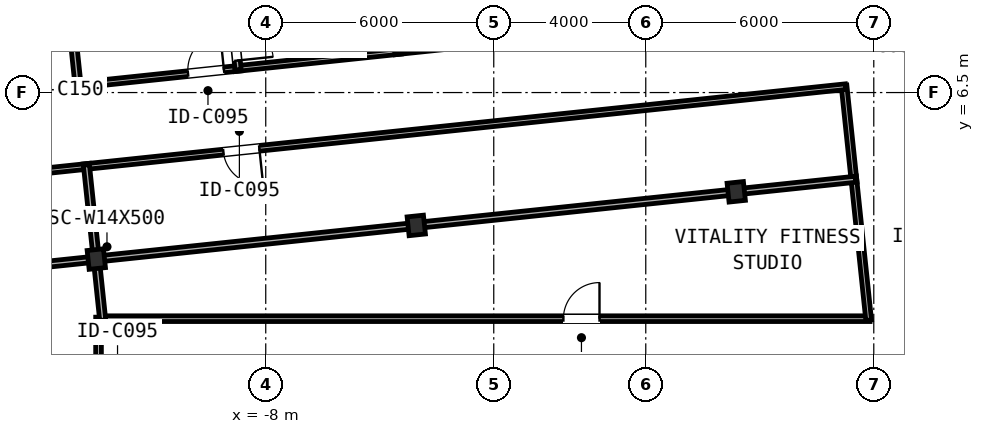
"""IFC4 building model, lengths in metres.
Left out: names, types, materials, properties, quantities, classifications, styles, units other than length and angle.
Written with IfcOpenShell. Run it as: python <this file> out.ifc"""

import sys

from ifc_helpers import new_model, si_unit, direction, frame, frame_2d, origin, origin_2d, place, context, subcontext, project, spatial, rectangle, i_section, extrude, element, fill, save


model = new_model("IFC4")
c1 = context("Model", 3, precision=1e-05, world=origin(), true_north=direction((0.0, 1.0)))
c2 = subcontext(c1, "Body", "Model", "MODEL_VIEW")
j1 = project(units=[si_unit("LENGTHUNIT", "METRE"), si_unit("PLANEANGLEUNIT", "RADIAN")], contexts=[c1])
p1 = place(None, origin())
s1 = spatial("IfcSite", under=j1, at=p1, CompositionType="ELEMENT")
p2 = place(p1, origin())
s2 = spatial("IfcBuilding", under=s1, at=p2, CompositionType="ELEMENT")
p3 = place(p2, frame((0.0, 0.0, 106.35)))
s3 = spatial("IfcBuildingStorey", under=s2, at=p3, CompositionType="ELEMENT", Elevation=106.35)
for number, where, z_axis, x_axis in (
    (1, (-12.459, 2.119, 0.0), (0.0, 0.0, 1.0), (0.995, 0.105, 0.0)),
    (2, (-4.039, 3.004, 0.0), (0.0, 0.0, 1.0), (0.995, 0.105, 0.0)),
    (3, (4.38, 3.888, 0.0), (0.0, 0.0, 1.0), (0.995, 0.105, 0.0)),
):
    element("IfcColumn", number, at=place(p3, frame(where, z_axis=z_axis, x_axis=x_axis)), inside=s3, PredefinedType="COLUMN", context=c2, shape_type="SweptSolid", body=[
        extrude(i_section(OverallWidth=0.432, OverallDepth=0.498, WebThickness=0.056, FlangeThickness=0.089, FilletRadius=0.031, at=origin_2d()), origin(), (0.0, 0.0, 1.0), 3.45),
    ])
p4 = place(p3, frame((-16.56, 6.313, 0.0), z_axis=(0.0, 0.0, 1.0), x_axis=(0.994525204328, 0.104496975826, 0.0)))
e4 = element("IfcWall", 4, at=p4, inside=s3, PredefinedType="PARTITIONING", context=c2, shape_type="SweptSolid", body=[
    extrude(rectangle(XDim=3.722, YDim=0.15, at=frame_2d((1.861, 0.0))), origin(), (0.0, 0.0, 1.0), 2.479),
])
p5 = place(p4, frame((0.315, 0.0, 0.0)))
e5 = element("IfcOpeningElement", 5, at=p5, cuts=e4, PredefinedType="OPENING", context=c2, shape_type="SweptSolid", body=[
    extrude(rectangle(XDim=0.95, YDim=2.15, at=frame_2d((0.475, 1.075))), frame((0.0, 0.085, 0.0), z_axis=(0.0, -1.0, 0.0), x_axis=(1.0, 0.0, 0.0)), (0.0, 0.0, 1.0), 0.17),
])
p6 = place(p3, frame((-13.021, 6.685, 0.0), z_axis=(0.0, 0.0, 1.0), x_axis=(0.9945197426, 0.104548943463, 0.0)))
e6 = element("IfcWall", 6, at=p6, inside=s3, PredefinedType="PARTITIONING", context=c2, shape_type="SweptSolid", body=[
    extrude(rectangle(XDim=4.397, YDim=0.15, at=frame_2d((2.199, 0.0))), origin(), (0.0, 0.0, 1.0), 2.479),
])
p7 = place(p6, frame((2.993, 0.0, 0.0)))
e7 = element("IfcOpeningElement", 7, at=p7, cuts=e6, PredefinedType="OPENING", context=c2, shape_type="SweptSolid", body=[
    extrude(rectangle(XDim=0.95, YDim=2.15, at=frame_2d((0.475, 1.075))), frame((0.0, 0.085, 0.0), z_axis=(0.0, -1.0, 0.0), x_axis=(1.0, 0.0, 0.0)), (0.0, 0.0, 1.0), 0.17),
])
p8 = place(p3, frame((-8.811, 7.127, 0.0), z_axis=(0.0, 0.0, 1.0), x_axis=(0.994524907824, 0.104499797695, 0.0)))
e8 = element("IfcWall", 8, at=p8, inside=s3, PredefinedType="PARTITIONING", context=c2, shape_type="SweptSolid", body=[
    extrude(rectangle(XDim=4.397, YDim=0.15, at=frame_2d((2.198, 0.0))), origin(), (0.0, 0.0, 1.0), 2.479),
])
p9 = place(p3, frame((-4.602, 7.57, 0.0), z_axis=(0.0, 0.0, 1.0), x_axis=(0.994522888708, 0.104519011838, 0.0)))
e9 = element("IfcWall", 9, at=p9, inside=s3, PredefinedType="PARTITIONING", context=c2, shape_type="SweptSolid", body=[
    extrude(rectangle(XDim=17.096, YDim=0.15, at=frame_2d((8.548, 0.0))), origin(), (0.0, 0.0, 1.0), 2.479),
])
p10 = place(p9, frame((12.361, 0.0, 0.0)))
e10 = element("IfcOpeningElement", 10, at=p10, cuts=e9, PredefinedType="OPENING", context=c2, shape_type="SweptSolid", body=[
    extrude(rectangle(XDim=0.95, YDim=2.15, at=frame_2d((0.475, 1.075))), frame((0.0, 0.085, 0.0), z_axis=(0.0, -1.0, 0.0), x_axis=(1.0, 0.0, 0.0)), (0.0, 0.0, 1.0), 0.17),
])
p11 = place(p3, frame((-12.633, 4.564, 0.0), z_axis=(0.0, 0.0, 1.0), x_axis=(-0.994525920558, -0.104490159046, 0.0)))
e11 = element("IfcWall", 11, at=p11, inside=s3, PredefinedType="PARTITIONING", context=c2, shape_type="SweptSolid", body=[
    extrude(rectangle(XDim=3.722, YDim=0.15, at=frame_2d((1.861, 0.0))), origin(), (0.0, 0.0, 1.0), 2.479),
])
p12 = place(p11, frame((2.457, 0.0, 0.0)))
e12 = element("IfcOpeningElement", 12, at=p12, cuts=e11, PredefinedType="OPENING", context=c2, shape_type="SweptSolid", body=[
    extrude(rectangle(XDim=0.95, YDim=2.15, at=frame_2d((0.475, 1.075))), frame((0.0, 0.085, 0.0), z_axis=(0.0, -1.0, 0.0), x_axis=(1.0, 0.0, 0.0)), (0.0, 0.0, 1.0), 0.17),
])
p13 = place(p3, frame((7.485, 4.132, 0.0), z_axis=(0.0, 0.0, 1.0), x_axis=(-0.104605724594, 0.994513771841, 0.0)))
e13 = element("IfcWall", 13, at=p13, inside=s3, PredefinedType="PARTITIONING", context=c2, shape_type="SweptSolid", body=[
    extrude(rectangle(XDim=2.572, YDim=0.15, at=frame_2d((1.286, 0.0))), origin(), (0.0, 0.0, 1.0), 2.479),
])
p14 = place(p3, frame((7.26, 6.655, 0.0), z_axis=(0.0, 0.0, 1.0), x_axis=(-0.994522421445, -0.104523457861, 0.0)))
e14 = element("IfcWall", 14, at=p14, inside=s3, PredefinedType="PARTITIONING", context=c2, shape_type="SweptSolid", body=[
    extrude(rectangle(XDim=20.167, YDim=0.15, at=frame_2d((10.083, 0.0))), origin(), (0.0, 0.0, 1.0), 2.479),
])
p15 = place(p14, frame((15.514, 0.0, 0.0)))
e15 = element("IfcOpeningElement", 15, at=p15, cuts=e14, PredefinedType="OPENING", context=c2, shape_type="SweptSolid", body=[
    extrude(rectangle(XDim=0.95, YDim=2.15, at=frame_2d((0.475, 1.075))), frame((0.0, 0.085, 0.0), z_axis=(0.0, -1.0, 0.0), x_axis=(1.0, 0.0, 0.0)), (0.0, 0.0, 1.0), 0.17),
])
p16 = place(p3, frame((-12.376, 0.55, 0.0), z_axis=(0.0, 0.0, 1.0), x_axis=(1.0, 0.0, 0.0)))
e16 = element("IfcWall", 16, at=p16, inside=s3, PredefinedType="PARTITIONING", context=c2, shape_type="SweptSolid", body=[
    extrude(rectangle(XDim=20.278, YDim=0.15, at=frame_2d((10.139, 0.0))), origin(), (0.0, 0.0, 1.0), 2.479),
])
p17 = place(p16, frame((12.209, 0.0, 0.0)))
e17 = element("IfcOpeningElement", 17, at=p17, cuts=e16, PredefinedType="OPENING", context=c2, shape_type="SweptSolid", body=[
    extrude(rectangle(XDim=0.95, YDim=2.15, at=frame_2d((0.475, 1.075))), frame((0.0, 0.085, 0.0), z_axis=(0.0, -1.0, 0.0), x_axis=(1.0, 0.0, 0.0)), (0.0, 0.0, 1.0), 0.17),
])
p18 = place(p3, frame((7.866, 0.51, 0.0), z_axis=(0.0, 0.0, 1.0), x_axis=(-0.104557897706, 0.994518801244, 0.0)))
e18 = element("IfcWall", 18, at=p18, inside=s3, PredefinedType="PARTITIONING", context=c2, shape_type="SweptSolid", body=[
    extrude(rectangle(XDim=3.806, YDim=0.15, at=frame_2d((1.903, 0.0))), origin(), (0.0, 0.0, 1.0), 2.479),
])
p19 = place(p3, frame((-12.4, -2.19, 0.0), z_axis=(0.0, 0.0, 1.0), x_axis=(0.0, 1.0, 0.0)))
e19 = element("IfcWall", 19, at=p19, inside=s3, PredefinedType="PARTITIONING", context=c2, shape_type="SweptSolid", body=[
    extrude(rectangle(XDim=2.78, YDim=0.15, at=frame_2d((1.39, 0.0))), origin(), (0.0, 0.0, 1.0), 2.225),
])
p20 = place(p19, frame((0.348, 0.0, 0.0)))
e20 = element("IfcOpeningElement", 20, at=p20, cuts=e19, PredefinedType="OPENING", context=c2, shape_type="SweptSolid", body=[
    extrude(rectangle(XDim=0.95, YDim=2.15, at=frame_2d((0.475, 1.075))), frame((0.0, 0.085, 0.0), z_axis=(0.0, -1.0, 0.0), x_axis=(1.0, 0.0, 0.0)), (0.0, 0.0, 1.0), 0.17),
])
p21 = place(p3, frame((-13.099, 8.207, 0.0), z_axis=(0.0, 0.0, 1.0), x_axis=(0.104578999325, -0.994516582516, 0.0)))
e21 = element("IfcWall", 21, at=p21, inside=s3, PredefinedType="PARTITIONING", context=c2, shape_type="SweptSolid", body=[
    extrude(rectangle(XDim=1.562, YDim=0.16, at=frame_2d((0.781, 0.0))), origin(), (0.0, 0.0, 1.0), 2.479),
])
p22 = place(p3, frame((-9.021, 9.911, 0.0), z_axis=(0.0, 0.0, 1.0), x_axis=(0.104559042439, -0.994518680892, 0.0)))
e22 = element("IfcWall", 22, at=p22, inside=s3, PredefinedType="PARTITIONING", context=c2, shape_type="SweptSolid", body=[
    extrude(rectangle(XDim=2.83, YDim=0.16, at=frame_2d((1.415, 0.0))), origin(), (0.0, 0.0, 1.0), 2.479),
])
p23 = place(p22, frame((1.633, 0.0, 0.0)))
e23 = element("IfcOpeningElement", 23, at=p23, cuts=e22, PredefinedType="OPENING", context=c2, shape_type="SweptSolid", body=[
    extrude(rectangle(XDim=0.95, YDim=2.15, at=frame_2d((0.475, 1.075))), frame((0.0, 0.09, 0.0), z_axis=(0.0, -1.0, 0.0), x_axis=(1.0, 0.0, 0.0)), (0.0, 0.0, 1.0), 0.18),
])
p24 = place(p3, frame((-4.679, 9.092, 0.0), z_axis=(0.0, 0.0, 1.0), x_axis=(0.104424383811, -0.994532829054, 0.0)))
e24 = element("IfcWall", 24, at=p24, inside=s3, PredefinedType="PARTITIONING", context=c2, shape_type="SweptSolid", body=[
    extrude(rectangle(XDim=1.562, YDim=0.16, at=frame_2d((0.781, 0.0))), origin(), (0.0, 0.0, 1.0), 2.479),
])
p25 = place(p3, frame((-12.719, 4.595, 0.0), z_axis=(0.0, 0.0, 1.0), x_axis=(0.104569435529, -0.994517588157, 0.0)))
e25 = element("IfcWall", 25, at=p25, inside=s3, PredefinedType="PARTITIONING", context=c2, shape_type="SweptSolid", body=[
    extrude(rectangle(XDim=2.314, YDim=0.16, at=frame_2d((1.157, 0.0))), origin(), (0.0, 0.0, 1.0), 2.479),
])
p26 = place(p3, frame((-12.634, 2.1, 0.0), z_axis=(0.0, 0.0, 1.0), x_axis=(-0.994524056968, -0.104507894972, 0.0)))
e26 = element("IfcWall", 26, at=p26, inside=s3, PredefinedType="PARTITIONING", context=c2, shape_type="SweptSolid", body=[
    extrude(rectangle(XDim=7.616, YDim=0.16, at=frame_2d((3.808, 0.0))), origin(), (0.0, 0.0, 1.0), 2.479),
])
p27 = place(p3, frame((-4.214, 2.985, 0.0), z_axis=(0.0, 0.0, 1.0), x_axis=(-0.994521269983, -0.104534413238, 0.0)))
e27 = element("IfcWall", 27, at=p27, inside=s3, PredefinedType="PARTITIONING", context=c2, shape_type="SweptSolid", body=[
    extrude(rectangle(XDim=8.114, YDim=0.16, at=frame_2d((4.057, 0.0))), origin(), (0.0, 0.0, 1.0), 2.479),
])
p28 = place(p3, frame((4.205, 3.87, 0.0), z_axis=(0.0, 0.0, 1.0), x_axis=(-0.994521598781, -0.104531285071, 0.0)))
e28 = element("IfcWall", 28, at=p28, inside=s3, PredefinedType="PARTITIONING", context=c2, shape_type="SweptSolid", body=[
    extrude(rectangle(XDim=8.114, YDim=0.16, at=frame_2d((4.057, 0.0))), origin(), (0.0, 0.0, 1.0), 2.479),
])
p29 = place(p3, frame((7.516, 4.218, 0.0), z_axis=(0.0, 0.0, 1.0), x_axis=(-0.994526106058, -0.104488393462, 0.0)))
e29 = element("IfcWall", 29, at=p29, inside=s3, PredefinedType="PARTITIONING", context=c2, shape_type="SweptSolid", body=[
    extrude(rectangle(XDim=2.977, YDim=0.16, at=frame_2d((1.488, 0.0))), origin(), (0.0, 0.0, 1.0), 2.479),
])
p30 = place(p3, frame((-12.29, 0.51, 0.0), z_axis=(0.0, 0.0, 1.0), x_axis=(-0.104534854339, 0.994521223619, 0.0)))
e30 = element("IfcWall", 30, at=p30, inside=s3, PredefinedType="PARTITIONING", context=c2, shape_type="SweptSolid", body=[
    extrude(rectangle(XDim=1.441, YDim=0.16, at=frame_2d((0.72, 0.0))), origin(), (0.0, 0.0, 1.0), 2.479),
])
p31 = place(p7, frame((0.95, 0.0, 0.0), z_axis=(0.0, 0.0, 1.0), x_axis=(-1.0, 0.0, 0.0)))
e31 = element("IfcDoor", 31, at=p31, inside=s3, OperationType="SINGLE_SWING_RIGHT", PredefinedType="DOOR", context=c2, shape_type="SweptSolid", body=[
    extrude(rectangle(XDim=0.95, YDim=2.15, at=frame_2d((0.475, 1.075))), frame((0.0, 0.025, 0.0), z_axis=(0.0, -1.0, 0.0), x_axis=(1.0, 0.0, 0.0)), (0.0, 0.0, 1.0), 0.05),
])
fill(e7, e31)
p32 = place(p23, frame((0.95, 0.0, 0.0), z_axis=(0.0, 0.0, 1.0), x_axis=(-1.0, 0.0, 0.0)))
e32 = element("IfcDoor", 32, at=p32, inside=s3, OperationType="SINGLE_SWING_RIGHT", PredefinedType="DOOR", context=c2, shape_type="SweptSolid", body=[
    extrude(rectangle(XDim=0.95, YDim=2.15, at=frame_2d((0.475, 1.075))), frame((0.0, 0.025, 0.0), z_axis=(0.0, -1.0, 0.0), x_axis=(1.0, 0.0, 0.0)), (0.0, 0.0, 1.0), 0.05),
])
fill(e23, e32)
p33 = place(p15, frame((0.95, 0.0, 0.0), z_axis=(0.0, 0.0, 1.0), x_axis=(-1.0, 0.0, 0.0)))
e33 = element("IfcDoor", 33, at=p33, inside=s3, OperationType="SINGLE_SWING_LEFT", PredefinedType="DOOR", context=c2, shape_type="SweptSolid", body=[
    extrude(rectangle(XDim=0.95, YDim=2.15, at=frame_2d((0.475, 1.075))), frame((0.0, 0.025, 0.0), z_axis=(0.0, -1.0, 0.0), x_axis=(1.0, 0.0, 0.0)), (0.0, 0.0, 1.0), 0.05),
])
fill(e15, e33)
p34 = place(p17, frame((0.95, 0.0, 0.0), z_axis=(0.0, 0.0, 1.0), x_axis=(-1.0, 0.0, 0.0)))
e34 = element("IfcDoor", 34, at=p34, inside=s3, OperationType="SINGLE_SWING_RIGHT", PredefinedType="DOOR", context=c2, shape_type="SweptSolid", body=[
    extrude(rectangle(XDim=0.95, YDim=2.15, at=frame_2d((0.475, 1.075))), frame((0.0, 0.025, 0.0), z_axis=(0.0, -1.0, 0.0), x_axis=(1.0, 0.0, 0.0)), (0.0, 0.0, 1.0), 0.05),
])
fill(e17, e34)
save(model, sys.argv[1])
